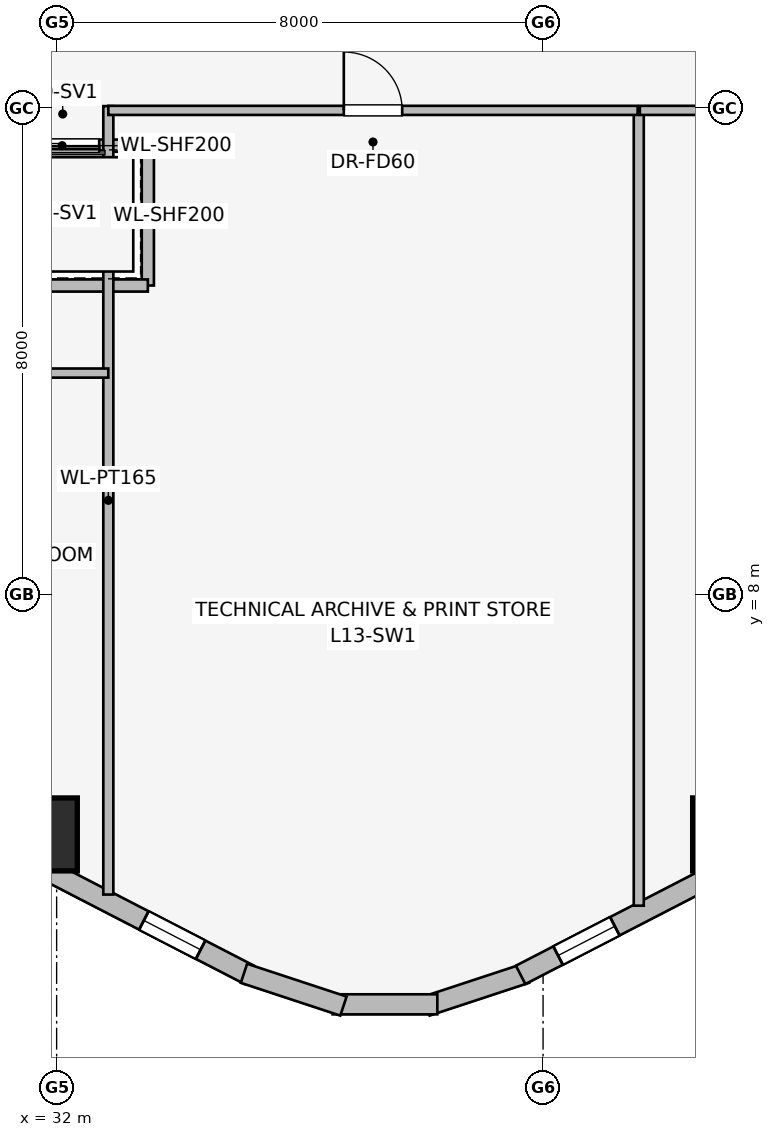
"""IFC4 building model, lengths in metres.
Left out: names, types, materials, properties, quantities, classifications, styles, units other than length and angle.
Written with IfcOpenShell. Run it as: python <this file> out.ifc"""

import sys

from ifc_helpers import new_model, si_unit, direction, frame, frame_2d, origin, origin_2d, place, context, subcontext, project, spatial, rectangle, extrude, element, fill, save


model = new_model("IFC4")
c1 = context("Model", 3, precision=1e-05, world=origin(), true_north=direction((0.0, 1.0)))
c2 = subcontext(c1, "Body", "Model", "MODEL_VIEW")
j1 = project(units=[si_unit("LENGTHUNIT", "METRE"), si_unit("PLANEANGLEUNIT", "RADIAN")], contexts=[c1])
p1 = place(None, origin())
s1 = spatial("IfcSite", under=j1, at=p1, CompositionType="ELEMENT")
p2 = place(p1, origin())
s2 = spatial("IfcBuilding", under=s1, at=p2, CompositionType="ELEMENT")
p3 = place(p2, frame((0.0, 0.0, 52.55)))
s3 = spatial("IfcBuildingStorey", under=s2, at=p3, CompositionType="ELEMENT", Elevation=52.55)
for number, where, z_axis, x_axis in (
    (1, (31.74, 4.053, 0.0), (0.0, 0.0, 1.0), (1.0, 0.0, 0.0)),
    (2, (43.06, 4.053, 0.0), (0.0, 0.0, 1.0), (1.0, 0.0, 0.0)),
):
    element("IfcColumn", number, at=place(p3, frame(where, z_axis=z_axis, x_axis=x_axis)), inside=s3, PredefinedType="COLUMN", context=c2, shape_type="SweptSolid", body=[
        extrude(rectangle(XDim=1.2, YDim=1.2, at=origin_2d()), origin(), (0.0, 0.0, 1.0), 3.65),
    ])
p4 = place(p3, frame((35.169, 1.743, 0.0), z_axis=(0.0, 0.0, 1.0), x_axis=(-0.888634413993, 0.458616264721, 0.0)))
e3 = element("IfcWall", 3, at=p4, inside=s3, PredefinedType="STANDARD", context=c2, shape_type="SweptSolid", body=[
    extrude(rectangle(XDim=20.531, YDim=0.34, at=frame_2d((10.266, 0.0))), origin(), (0.0, 0.0, 1.0), 2.654),
])
p5 = place(p4, frame((0.902, 0.0, 0.75)))
e4 = element("IfcOpeningElement", 4, at=p5, cuts=e3, PredefinedType="OPENING", context=c2, shape_type="SweptSolid", body=[
    extrude(rectangle(XDim=1.05, YDim=1.4, at=frame_2d((0.525, 0.7))), frame((0.0, 0.18, 0.0), z_axis=(0.0, -1.0, 0.0), x_axis=(1.0, 0.0, 0.0)), (0.0, 0.0, 1.0), 0.36),
])
p6 = place(p4, frame((5.903, 0.0, 0.75)))
e5 = element("IfcOpeningElement", 5, at=p6, cuts=e3, PredefinedType="OPENING", context=c2, shape_type="SweptSolid", body=[
    extrude(rectangle(XDim=1.5, YDim=1.5, at=frame_2d((0.75, 0.75))), frame((0.0, 0.18, 0.0), z_axis=(0.0, -1.0, 0.0), x_axis=(1.0, 0.0, 0.0)), (0.0, 0.0, 1.0), 0.36),
])
p7 = place(p4, frame((9.516, 0.0, 0.75)))
e6 = element("IfcOpeningElement", 6, at=p7, cuts=e3, PredefinedType="OPENING", context=c2, shape_type="SweptSolid", body=[
    extrude(rectangle(XDim=1.5, YDim=1.5, at=frame_2d((0.75, 0.75))), frame((0.0, 0.18, 0.0), z_axis=(0.0, -1.0, 0.0), x_axis=(1.0, 0.0, 0.0)), (0.0, 0.0, 1.0), 0.36),
])
p8 = place(p4, frame((13.129, 0.0, 0.75)))
e7 = element("IfcOpeningElement", 7, at=p8, cuts=e3, PredefinedType="OPENING", context=c2, shape_type="SweptSolid", body=[
    extrude(rectangle(XDim=1.5, YDim=1.5, at=frame_2d((0.75, 0.75))), frame((0.0, 0.18, 0.0), z_axis=(0.0, -1.0, 0.0), x_axis=(1.0, 0.0, 0.0)), (0.0, 0.0, 1.0), 0.36),
])
p9 = place(p4, frame((17.673, 0.0, 0.75)))
e8 = element("IfcOpeningElement", 8, at=p9, cuts=e3, PredefinedType="OPENING", context=c2, shape_type="SweptSolid", body=[
    extrude(rectangle(XDim=1.8, YDim=1.5, at=frame_2d((0.9, 0.75))), frame((0.0, 0.18, 0.0), z_axis=(0.0, -1.0, 0.0), x_axis=(1.0, 0.0, 0.0)), (0.0, 0.0, 1.0), 0.36),
])
p10 = place(p3, frame((39.719, 1.769, 0.0), z_axis=(0.0, 0.0, 1.0), x_axis=(-0.94976901097, -0.312951794691, 0.0)))
e9 = element("IfcWall", 9, at=p10, inside=s3, PredefinedType="STANDARD", context=c2, shape_type="SweptSolid", body=[
    extrude(rectangle(XDim=1.722, YDim=0.33, at=frame_2d((0.861, 0.0))), origin(), (0.0, 0.0, 1.0), 3.36),
])
p11 = place(p3, frame((38.261, 1.259, 0.0), z_axis=(0.0, 0.0, 1.0), x_axis=(-1.0, 0.0, 0.0)))
e10 = element("IfcWall", 10, at=p11, inside=s3, PredefinedType="STANDARD", context=c2, shape_type="SweptSolid", body=[
    extrude(rectangle(XDim=1.722, YDim=0.33, at=frame_2d((0.861, 0.0))), origin(), (0.0, 0.0, 1.0), 3.36),
])
p12 = place(p3, frame((36.717, 1.23, 0.0), z_axis=(0.0, 0.0, 1.0), x_axis=(-0.94976901097, 0.312951794691, 0.0)))
e11 = element("IfcWall", 11, at=p12, inside=s3, PredefinedType="STANDARD", context=c2, shape_type="SweptSolid", body=[
    extrude(rectangle(XDim=1.722, YDim=0.33, at=frame_2d((0.861, 0.0))), origin(), (0.0, 0.0, 1.0), 3.36),
])
p13 = place(p3, frame((57.876, 11.159, 0.0), z_axis=(0.0, 0.0, 1.0), x_axis=(-0.888634413993, -0.458616264721, 0.0)))
e12 = element("IfcWall", 12, at=p13, inside=s3, PredefinedType="STANDARD", context=c2, shape_type="SweptSolid", body=[
    extrude(rectangle(XDim=20.531, YDim=0.34, at=frame_2d((10.266, 0.0))), origin(), (0.0, 0.0, 1.0), 2.654),
])
p14 = place(p13, frame((1.058, 0.0, 0.75)))
e13 = element("IfcOpeningElement", 13, at=p14, cuts=e12, PredefinedType="OPENING", context=c2, shape_type="SweptSolid", body=[
    extrude(rectangle(XDim=1.8, YDim=1.5, at=frame_2d((0.9, 0.75))), frame((0.0, 0.18, 0.0), z_axis=(0.0, -1.0, 0.0), x_axis=(1.0, 0.0, 0.0)), (0.0, 0.0, 1.0), 0.36),
])
p15 = place(p13, frame((5.156, 0.0, 0.75)))
e14 = element("IfcOpeningElement", 14, at=p15, cuts=e12, PredefinedType="OPENING", context=c2, shape_type="SweptSolid", body=[
    extrude(rectangle(XDim=1.5, YDim=1.5, at=frame_2d((0.75, 0.75))), frame((0.0, 0.18, 0.0), z_axis=(0.0, -1.0, 0.0), x_axis=(1.0, 0.0, 0.0)), (0.0, 0.0, 1.0), 0.36),
])
p16 = place(p13, frame((8.123, 0.0, 0.75)))
e15 = element("IfcOpeningElement", 15, at=p16, cuts=e12, PredefinedType="OPENING", context=c2, shape_type="SweptSolid", body=[
    extrude(rectangle(XDim=1.8, YDim=1.5, at=frame_2d((0.9, 0.75))), frame((0.0, 0.18, 0.0), z_axis=(0.0, -1.0, 0.0), x_axis=(1.0, 0.0, 0.0)), (0.0, 0.0, 1.0), 0.36),
])
p17 = place(p13, frame((10.788, 0.0, 0.75)))
e16 = element("IfcOpeningElement", 16, at=p17, cuts=e12, PredefinedType="OPENING", context=c2, shape_type="SweptSolid", body=[
    extrude(rectangle(XDim=1.8, YDim=1.5, at=frame_2d((0.9, 0.75))), frame((0.0, 0.18, 0.0), z_axis=(0.0, -1.0, 0.0), x_axis=(1.0, 0.0, 0.0)), (0.0, 0.0, 1.0), 0.36),
])
p18 = place(p13, frame((13.453, 0.0, 0.75)))
e17 = element("IfcOpeningElement", 17, at=p18, cuts=e12, PredefinedType="OPENING", context=c2, shape_type="SweptSolid", body=[
    extrude(rectangle(XDim=1.8, YDim=1.5, at=frame_2d((0.9, 0.75))), frame((0.0, 0.18, 0.0), z_axis=(0.0, -1.0, 0.0), x_axis=(1.0, 0.0, 0.0)), (0.0, 0.0, 1.0), 0.36),
])
p19 = place(p13, frame((18.788, 0.0, 0.75)))
e18 = element("IfcOpeningElement", 18, at=p19, cuts=e12, PredefinedType="OPENING", context=c2, shape_type="SweptSolid", body=[
    extrude(rectangle(XDim=1.05, YDim=1.4, at=frame_2d((0.525, 0.7))), frame((0.0, 0.18, 0.0), z_axis=(0.0, -1.0, 0.0), x_axis=(1.0, 0.0, 0.0)), (0.0, 0.0, 1.0), 0.36),
])
p20 = place(p3, frame((33.5, 15.38, 0.0), z_axis=(0.0, 0.0, 1.0), x_axis=(-1.0, 0.0, 0.0)))
e19 = element("IfcWall", 19, at=p20, inside=s3, PredefinedType="PARTITIONING", context=c2, shape_type="SweptSolid", body=[
    extrude(rectangle(XDim=2.82, YDim=0.2, at=frame_2d((1.41, 0.0))), origin(), (0.0, 0.0, 1.0), 3.36),
])
p21 = place(p20, frame((0.8, 0.0, 0.0)))
e20 = element("IfcOpeningElement", 20, at=p21, cuts=e19, PredefinedType="OPENING", context=c2, shape_type="SweptSolid", body=[
    extrude(rectangle(XDim=1.2, YDim=2.2, at=frame_2d((0.6, 1.1))), frame((0.0, 0.11, 0.0), z_axis=(0.0, -1.0, 0.0), x_axis=(1.0, 0.0, 0.0)), (0.0, 0.0, 1.0), 0.22),
])
p22 = place(p3, frame((33.5, 13.08, 0.0), z_axis=(0.0, 0.0, 1.0), x_axis=(0.0, 1.0, 0.0)))
e21 = element("IfcWall", 21, at=p22, inside=s3, PredefinedType="PARTITIONING", context=c2, shape_type="SweptSolid", body=[
    extrude(rectangle(XDim=2.3, YDim=0.2, at=frame_2d((1.15, 0.0))), origin(), (0.0, 0.0, 1.0), 3.36),
])
p23 = place(p3, frame((30.879, 13.08, 0.0), z_axis=(0.0, 0.0, 1.0), x_axis=(1.0, 0.0, 0.0)))
e22 = element("IfcWall", 22, at=p23, inside=s3, PredefinedType="PARTITIONING", context=c2, shape_type="SweptSolid", body=[
    extrude(rectangle(XDim=2.621, YDim=0.2, at=frame_2d((1.311, 0.0))), origin(), (0.0, 0.0, 1.0), 3.36),
])
p24 = place(p3, frame((32.85, 3.064, 0.0), z_axis=(0.0, 0.0, 1.0), x_axis=(0.0, 1.0, 0.0)))
e23 = element("IfcWall", 23, at=p24, inside=s3, PredefinedType="PARTITIONING", context=c2, shape_type="SweptSolid", body=[
    extrude(rectangle(XDim=12.966, YDim=0.165, at=frame_2d((6.483, 0.0))), origin(), (0.0, 0.0, 1.0), 3.36),
])
p25 = place(p3, frame((16.487, 11.64, 0.0), z_axis=(0.0, 0.0, 1.0), x_axis=(1.0, 0.0, 0.0)))
e24 = element("IfcWall", 24, at=p25, inside=s3, PredefinedType="PARTITIONING", context=c2, shape_type="SweptSolid", body=[
    extrude(rectangle(XDim=16.363, YDim=0.15, at=frame_2d((8.182, 0.0))), origin(), (0.0, 0.0, 1.0), 3.36),
])
p26 = place(p25, frame((6.513, 0.0, 0.0)))
e25 = element("IfcOpeningElement", 25, at=p26, cuts=e24, PredefinedType="OPENING", context=c2, shape_type="SweptSolid", body=[
    extrude(rectangle(XDim=0.9, YDim=2.0, at=frame_2d((0.45, 1.0))), frame((0.0, 0.085, 0.0), z_axis=(0.0, -1.0, 0.0), x_axis=(1.0, 0.0, 0.0)), (0.0, 0.0, 1.0), 0.17),
])
p27 = place(p3, frame((41.574, 2.881, 0.0), z_axis=(0.0, 0.0, 1.0), x_axis=(0.0, 1.0, 0.0)))
e26 = element("IfcWall", 26, at=p27, inside=s3, PredefinedType="PARTITIONING", context=c2, shape_type="SweptSolid", body=[
    extrude(rectangle(XDim=13.049, YDim=0.165, at=frame_2d((6.524, 0.0))), origin(), (0.0, 0.0, 1.0), 2.483),
])
p28 = place(p3, frame((32.85, 15.96, 0.0), z_axis=(0.0, 0.0, 1.0), x_axis=(1.0, 0.0, 0.0)))
e27 = element("IfcWall", 27, at=p28, inside=s3, PredefinedType="PARTITIONING", context=c2, shape_type="SweptSolid", body=[
    extrude(rectangle(XDim=8.706, YDim=0.15, at=frame_2d((4.353, 0.0))), origin(), (0.0, 0.0, 1.0), 3.36),
])
p29 = place(p28, frame((3.873, 0.0, 0.0)))
e28 = element("IfcOpeningElement", 28, at=p29, cuts=e27, PredefinedType="OPENING", context=c2, shape_type="SweptSolid", body=[
    extrude(rectangle(XDim=0.96, YDim=2.0, at=frame_2d((0.48, 1.0))), frame((0.0, 0.085, 0.0), z_axis=(0.0, -1.0, 0.0), x_axis=(1.0, 0.0, 0.0)), (0.0, 0.0, 1.0), 0.17),
])
p30 = place(p3, frame((41.592, 15.96, 0.0), z_axis=(0.0, 0.0, 1.0), x_axis=(1.0, 0.0, 0.0)))
e29 = element("IfcWall", 29, at=p30, inside=s3, PredefinedType="PARTITIONING", context=c2, shape_type="SweptSolid", body=[
    extrude(rectangle(XDim=9.699, YDim=0.15, at=frame_2d((4.85, 0.0))), origin(), (0.0, 0.0, 1.0), 3.36),
])
p31 = place(p30, frame((4.37, 0.0, 0.0)))
e30 = element("IfcOpeningElement", 30, at=p31, cuts=e29, PredefinedType="OPENING", context=c2, shape_type="SweptSolid", body=[
    extrude(rectangle(XDim=0.96, YDim=2.0, at=frame_2d((0.48, 1.0))), frame((0.0, 0.085, 0.0), z_axis=(0.0, -1.0, 0.0), x_axis=(1.0, 0.0, 0.0)), (0.0, 0.0, 1.0), 0.17),
])
p32 = place(p5, origin())
e31 = element("IfcWindow", 31, at=p32, inside=s3, PartitioningType="SINGLE_PANEL", PredefinedType="WINDOW", context=c2, shape_type="SweptSolid", body=[
    extrude(rectangle(XDim=1.05, YDim=1.4, at=frame_2d((0.525, 0.7))), frame((0.0, 0.03, 0.0), z_axis=(0.0, -1.0, 0.0), x_axis=(1.0, 0.0, 0.0)), (0.0, 0.0, 1.0), 0.06),
])
fill(e4, e31)
p33 = place(p19, origin())
e32 = element("IfcWindow", 32, at=p33, inside=s3, PartitioningType="SINGLE_PANEL", PredefinedType="WINDOW", context=c2, shape_type="SweptSolid", body=[
    extrude(rectangle(XDim=1.05, YDim=1.4, at=frame_2d((0.525, 0.7))), frame((0.0, 0.03, 0.0), z_axis=(0.0, -1.0, 0.0), x_axis=(1.0, 0.0, 0.0)), (0.0, 0.0, 1.0), 0.06),
])
fill(e18, e32)
p34 = place(p21, origin())
e33 = element("IfcDoor", 33, at=p34, inside=s3, OperationType="SLIDING_TO_RIGHT", PredefinedType="DOOR", context=c2, shape_type="SweptSolid", body=[
    extrude(rectangle(XDim=1.2, YDim=2.2, at=frame_2d((0.6, 1.1))), frame((0.0, 0.025, 0.0), z_axis=(0.0, -1.0, 0.0), x_axis=(1.0, 0.0, 0.0)), (0.0, 0.0, 1.0), 0.05),
])
fill(e20, e33)
p35 = place(p29, origin())
e34 = element("IfcDoor", 34, at=p35, inside=s3, OperationType="SINGLE_SWING_LEFT", PredefinedType="DOOR", context=c2, shape_type="SweptSolid", body=[
    extrude(rectangle(XDim=0.96, YDim=2.0, at=frame_2d((0.48, 1.0))), frame((0.0, 0.025, 0.0), z_axis=(0.0, -1.0, 0.0), x_axis=(1.0, 0.0, 0.0)), (0.0, 0.0, 1.0), 0.05),
])
fill(e28, e34)
save(model, sys.argv[1])
